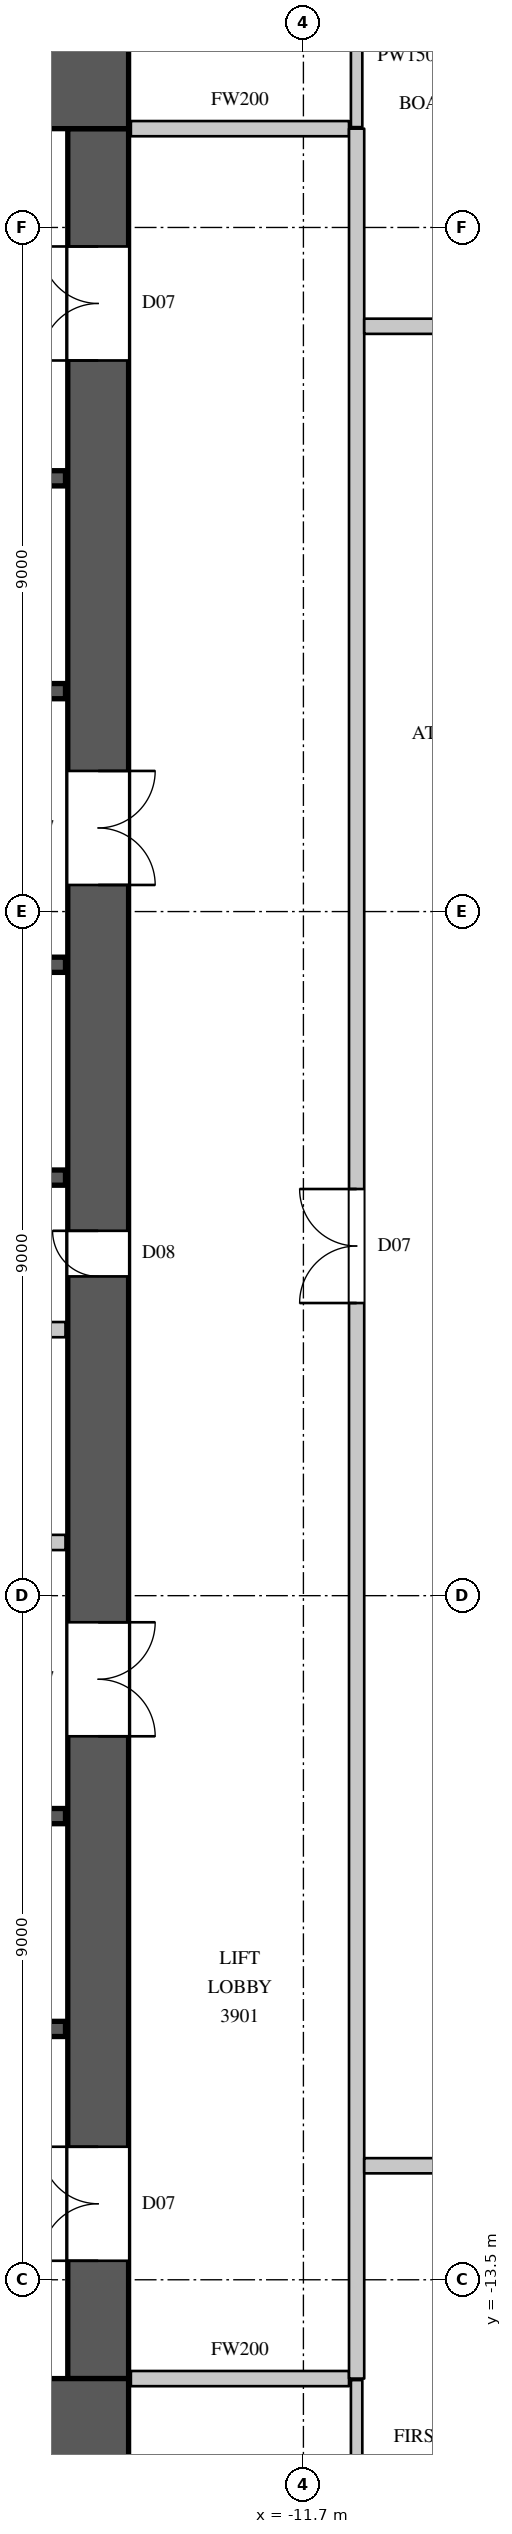
"""IFC4 building model, lengths in metres.
Left out: names, types, materials, properties, quantities, classifications, styles, units other than length and angle.
Written with IfcOpenShell. Run it as: python <this file> out.ifc"""

import sys

from ifc_helpers import new_model, si_unit, direction, frame, frame_2d, origin, place, context, subcontext, project, spatial, rectangle, extrude, element, fill, save


model = new_model("IFC4")
c1 = context("Model", 3, precision=1e-05, world=origin(), true_north=direction((0.0, 1.0)))
c2 = subcontext(c1, "Body", "Model", "MODEL_VIEW")
j1 = project(units=[si_unit("LENGTHUNIT", "METRE"), si_unit("PLANEANGLEUNIT", "RADIAN")], contexts=[c1])
p1 = place(None, origin())
s1 = spatial("IfcSite", under=j1, at=p1, CompositionType="ELEMENT")
p2 = place(p1, origin())
s2 = spatial("IfcBuilding", under=s1, at=p2, CompositionType="ELEMENT")
p3 = place(p2, frame((0.0, 0.0, 181.0)))
s3 = spatial("IfcBuildingStorey", under=s2, at=p3, CompositionType="ELEMENT", Elevation=181.0)
for number, where, z_axis, x_axis in (
    (1, (-30.0, 15.4, 0.0), (0.0, 0.0, 1.0), (1.0, 0.0, 0.0)),
    (2, (-30.0, -15.4, 0.0), (0.0, 0.0, 1.0), (1.0, 0.0, 0.0)),
):
    element("IfcWall", number, at=place(p3, frame(where, z_axis=z_axis, x_axis=x_axis)), inside=s3, PredefinedType="SHEAR", context=c2, shape_type="SweptSolid", body=[
        extrude(rectangle(XDim=16.0, YDim=1.2, at=frame_2d((8.0, 0.0))), origin(), (0.0, 0.0, 1.0), 4.1),
    ])
p4 = place(p3, frame((-14.4, -14.8, 0.0), z_axis=(0.0, 0.0, 1.0), x_axis=(0.0, 1.0, 0.0)))
e3 = element("IfcWall", 3, at=p4, inside=s3, PredefinedType="SHEAR", context=c2, shape_type="SweptSolid", body=[
    extrude(rectangle(XDim=29.6, YDim=0.8, at=frame_2d((14.8, 0.0))), origin(), (0.0, 0.0, 1.0), 4.1),
])
p5 = place(p4, frame((1.55, 0.0, 0.0)))
e4 = element("IfcOpeningElement", 4, at=p5, cuts=e3, PredefinedType="OPENING", context=c2, shape_type="SweptSolid", body=[
    extrude(rectangle(XDim=1.5, YDim=2.4, at=frame_2d((0.75, 1.2))), frame((0.0, 0.41, 0.0), z_axis=(0.0, -1.0, 0.0), x_axis=(1.0, 0.0, 0.0)), (0.0, 0.0, 1.0), 0.82),
])
p6 = place(p4, frame((26.55, 0.0, 0.0)))
e5 = element("IfcOpeningElement", 5, at=p6, cuts=e3, PredefinedType="OPENING", context=c2, shape_type="SweptSolid", body=[
    extrude(rectangle(XDim=1.5, YDim=2.4, at=frame_2d((0.75, 1.2))), frame((0.0, 0.41, 0.0), z_axis=(0.0, -1.0, 0.0), x_axis=(1.0, 0.0, 0.0)), (0.0, 0.0, 1.0), 0.82),
])
p7 = place(p4, frame((8.45, 0.0, 0.0)))
e6 = element("IfcOpeningElement", 6, at=p7, cuts=e3, PredefinedType="OPENING", context=c2, shape_type="SweptSolid", body=[
    extrude(rectangle(XDim=1.5, YDim=2.4, at=frame_2d((0.75, 1.2))), frame((0.0, 0.41, 0.0), z_axis=(0.0, -1.0, 0.0), x_axis=(1.0, 0.0, 0.0)), (0.0, 0.0, 1.0), 0.82),
])
p8 = place(p4, frame((19.65, 0.0, 0.0)))
e7 = element("IfcOpeningElement", 7, at=p8, cuts=e3, PredefinedType="OPENING", context=c2, shape_type="SweptSolid", body=[
    extrude(rectangle(XDim=1.5, YDim=2.4, at=frame_2d((0.75, 1.2))), frame((0.0, 0.41, 0.0), z_axis=(0.0, -1.0, 0.0), x_axis=(1.0, 0.0, 0.0)), (0.0, 0.0, 1.0), 0.82),
])
p9 = place(p4, frame((14.5, 0.0, 0.0)))
e8 = element("IfcOpeningElement", 8, at=p9, cuts=e3, PredefinedType="OPENING", context=c2, shape_type="SweptSolid", body=[
    extrude(rectangle(XDim=0.6, YDim=2.0, at=frame_2d((0.3, 1.0))), frame((0.0, 0.41, 0.0), z_axis=(0.0, -1.0, 0.0), x_axis=(1.0, 0.0, 0.0)), (0.0, 0.0, 1.0), 0.82),
])
p10 = place(p3, frame((-29.17, -3.8, 0.0), z_axis=(0.0, 0.0, 1.0), x_axis=(1.0, 0.0, 0.0)))
e9 = element("IfcWall", 9, at=p10, inside=s3, PredefinedType="PARTITIONING", context=c2, shape_type="SweptSolid", body=[
    extrude(rectangle(XDim=14.34, YDim=0.2, at=frame_2d((7.17, 0.0))), origin(), (0.0, 0.0, 1.0), 3.8),
])
p11 = place(p10, frame((6.7, 0.0, 0.0)))
e10 = element("IfcOpeningElement", 10, at=p11, cuts=e9, PredefinedType="OPENING", context=c2, shape_type="SweptSolid", body=[
    extrude(rectangle(XDim=0.9, YDim=2.2, at=frame_2d((0.45, 1.1))), frame((0.0, 0.11, 0.0), z_axis=(0.0, -1.0, 0.0), x_axis=(1.0, 0.0, 0.0)), (0.0, 0.0, 1.0), 0.22),
])
for number, where, z_axis, x_axis in (
    (11, (-13.97, -14.8, 0.0), (0.0, 0.0, 1.0), (1.0, 0.0, 0.0)),
    (12, (-13.97, 14.8, 0.0), (0.0, 0.0, 1.0), (1.0, 0.0, 0.0)),
):
    element("IfcWall", number, at=place(p3, frame(where, z_axis=z_axis, x_axis=x_axis)), inside=s3, PredefinedType="PARTITIONING", context=c2, shape_type="SweptSolid", body=[
        extrude(rectangle(XDim=2.87, YDim=0.2, at=frame_2d((1.435, 0.0))), origin(), (0.0, 0.0, 1.0), 3.8),
    ])
p12 = place(p3, frame((-11.0, -14.8, 0.0), z_axis=(0.0, 0.0, 1.0), x_axis=(0.0, 1.0, 0.0)))
e13 = element("IfcWall", 13, at=p12, inside=s3, PredefinedType="PARTITIONING", context=c2, shape_type="SweptSolid", body=[
    extrude(rectangle(XDim=29.6, YDim=0.2, at=frame_2d((14.8, 0.0))), origin(), (0.0, 0.0, 1.0), 3.8),
])
p13 = place(p12, frame((14.15, 0.0, 0.0)))
e14 = element("IfcOpeningElement", 14, at=p13, cuts=e13, PredefinedType="OPENING", context=c2, shape_type="SweptSolid", body=[
    extrude(rectangle(XDim=1.5, YDim=2.4, at=frame_2d((0.75, 1.2))), frame((0.0, 0.11, 0.0), z_axis=(0.0, -1.0, 0.0), x_axis=(1.0, 0.0, 0.0)), (0.0, 0.0, 1.0), 0.22),
])
p14 = place(p3, frame((-10.9, -12.0, 0.0), z_axis=(0.0, 0.0, 1.0), x_axis=(1.0, 0.0, 0.0)))
e15 = element("IfcWall", 15, at=p14, inside=s3, PredefinedType="PARTITIONING", context=c2, shape_type="SweptSolid", body=[
    extrude(rectangle(XDim=21.8, YDim=0.2, at=frame_2d((10.9, 0.0))), origin(), (0.0, 0.0, 1.0), 3.8),
])
p15 = place(p14, frame((0.95, 0.0, 0.0)))
e16 = element("IfcOpeningElement", 16, at=p15, cuts=e15, PredefinedType="OPENING", context=c2, shape_type="SweptSolid", body=[
    extrude(rectangle(XDim=0.9, YDim=2.2, at=frame_2d((0.45, 1.1))), frame((0.0, 0.11, 0.0), z_axis=(0.0, -1.0, 0.0), x_axis=(1.0, 0.0, 0.0)), (0.0, 0.0, 1.0), 0.22),
])
p16 = place(p14, frame((3.95, 0.0, 0.0)))
e17 = element("IfcOpeningElement", 17, at=p16, cuts=e15, PredefinedType="OPENING", context=c2, shape_type="SweptSolid", body=[
    extrude(rectangle(XDim=0.9, YDim=2.2, at=frame_2d((0.45, 1.1))), frame((0.0, 0.11, 0.0), z_axis=(0.0, -1.0, 0.0), x_axis=(1.0, 0.0, 0.0)), (0.0, 0.0, 1.0), 0.22),
])
p17 = place(p14, frame((6.7, 0.0, 0.0)))
e18 = element("IfcOpeningElement", 18, at=p17, cuts=e15, PredefinedType="OPENING", context=c2, shape_type="SweptSolid", body=[
    extrude(rectangle(XDim=0.9, YDim=2.2, at=frame_2d((0.45, 1.1))), frame((0.0, 0.11, 0.0), z_axis=(0.0, -1.0, 0.0), x_axis=(1.0, 0.0, 0.0)), (0.0, 0.0, 1.0), 0.22),
])
p18 = place(p14, frame((10.0, 0.0, 0.0)))
e19 = element("IfcOpeningElement", 19, at=p18, cuts=e15, PredefinedType="OPENING", context=c2, shape_type="SweptSolid", body=[
    extrude(rectangle(XDim=0.9, YDim=2.2, at=frame_2d((0.45, 1.1))), frame((0.0, 0.11, 0.0), z_axis=(0.0, -1.0, 0.0), x_axis=(1.0, 0.0, 0.0)), (0.0, 0.0, 1.0), 0.22),
])
p19 = place(p14, frame((13.55, 0.0, 0.0)))
e20 = element("IfcOpeningElement", 20, at=p19, cuts=e15, PredefinedType="OPENING", context=c2, shape_type="SweptSolid", body=[
    extrude(rectangle(XDim=0.9, YDim=2.2, at=frame_2d((0.45, 1.1))), frame((0.0, 0.11, 0.0), z_axis=(0.0, -1.0, 0.0), x_axis=(1.0, 0.0, 0.0)), (0.0, 0.0, 1.0), 0.22),
])
p20 = place(p14, frame((15.8, 0.0, 0.0)))
e21 = element("IfcOpeningElement", 21, at=p20, cuts=e15, PredefinedType="OPENING", context=c2, shape_type="SweptSolid", body=[
    extrude(rectangle(XDim=1.1, YDim=2.4, at=frame_2d((0.55, 1.2))), frame((0.0, 0.11, 0.0), z_axis=(0.0, -1.0, 0.0), x_axis=(1.0, 0.0, 0.0)), (0.0, 0.0, 1.0), 0.22),
])
p21 = place(p14, frame((18.0, 0.0, 0.0)))
e22 = element("IfcOpeningElement", 22, at=p21, cuts=e15, PredefinedType="OPENING", context=c2, shape_type="SweptSolid", body=[
    extrude(rectangle(XDim=1.1, YDim=2.4, at=frame_2d((0.55, 1.2))), frame((0.0, 0.11, 0.0), z_axis=(0.0, -1.0, 0.0), x_axis=(1.0, 0.0, 0.0)), (0.0, 0.0, 1.0), 0.22),
])
p22 = place(p3, frame((-10.9, 12.2, 0.0), z_axis=(0.0, 0.0, 1.0), x_axis=(1.0, 0.0, 0.0)))
e23 = element("IfcWall", 23, at=p22, inside=s3, PredefinedType="PARTITIONING", context=c2, shape_type="SweptSolid", body=[
    extrude(rectangle(XDim=3.704, YDim=0.2, at=frame_2d((1.852, 0.0))), origin(), (0.0, 0.0, 1.0), 3.8),
])
p23 = place(p22, frame((1.7, 0.0, 0.0)))
e24 = element("IfcOpeningElement", 24, at=p23, cuts=e23, PredefinedType="OPENING", context=c2, shape_type="SweptSolid", body=[
    extrude(rectangle(XDim=1.1, YDim=2.4, at=frame_2d((0.55, 1.2))), frame((0.0, 0.11, 0.0), z_axis=(0.0, -1.0, 0.0), x_axis=(1.0, 0.0, 0.0)), (0.0, 0.0, 1.0), 0.22),
])
for number, where, z_axis, x_axis in (
    (25, (-11.0, -16.7, 0.0), (0.0, 0.0, 1.0), (0.0, 1.0, 0.0)),
    (26, (-11.0, 14.82, 0.0), (0.0, 0.0, 1.0), (0.0, 1.0, 0.0)),
):
    element("IfcWall", number, at=place(p3, frame(where, z_axis=z_axis, x_axis=x_axis)), inside=s3, PredefinedType="PARTITIONING", context=c2, shape_type="SweptSolid", body=[
        extrude(rectangle(XDim=1.88, YDim=0.15, at=frame_2d((0.94, 0.0))), origin(), (0.0, 0.0, 1.0), 3.8),
    ])
p24 = place(p3, frame((-29.17, -1.0, 0.0), z_axis=(0.0, 0.0, 1.0), x_axis=(1.0, 0.0, 0.0)))
e27 = element("IfcWall", 27, at=p24, inside=s3, PredefinedType="PARTITIONING", context=c2, shape_type="SweptSolid", body=[
    extrude(rectangle(XDim=14.34, YDim=0.2, at=frame_2d((7.17, 0.0))), origin(), (0.0, 0.0, 1.0), 3.8),
])
p25 = place(p3, frame((-26.08, 1.0, 0.0), z_axis=(0.0, 0.0, 1.0), x_axis=(1.0, 0.0, 0.0)))
e28 = element("IfcWall", 28, at=p25, inside=s3, PredefinedType="SHEAR", context=c2, shape_type="SweptSolid", body=[
    extrude(rectangle(XDim=11.25, YDim=0.2, at=frame_2d((5.625, 0.0))), origin(), (0.0, 0.0, 1.0), 3.8),
])
p26 = place(p3, frame((-26.08, 3.8, 0.0), z_axis=(0.0, 0.0, 1.0), x_axis=(1.0, 0.0, 0.0)))
e29 = element("IfcWall", 29, at=p26, inside=s3, PredefinedType="SHEAR", context=c2, shape_type="SweptSolid", body=[
    extrude(rectangle(XDim=11.25, YDim=0.2, at=frame_2d((5.625, 0.0))), origin(), (0.0, 0.0, 1.0), 3.8),
])
p27 = place(p26, frame((0.8, 0.0, 0.0)))
e30 = element("IfcOpeningElement", 30, at=p27, cuts=e29, PredefinedType="OPENING", context=c2, shape_type="SweptSolid", body=[
    extrude(rectangle(XDim=1.1, YDim=2.2, at=frame_2d((0.55, 1.1))), frame((0.0, 0.11, 0.0), z_axis=(0.0, -1.0, 0.0), x_axis=(1.0, 0.0, 0.0)), (0.0, 0.0, 1.0), 0.22),
])
p28 = place(p26, frame((3.55, 0.0, 0.0)))
e31 = element("IfcOpeningElement", 31, at=p28, cuts=e29, PredefinedType="OPENING", context=c2, shape_type="SweptSolid", body=[
    extrude(rectangle(XDim=1.1, YDim=2.2, at=frame_2d((0.55, 1.1))), frame((0.0, 0.11, 0.0), z_axis=(0.0, -1.0, 0.0), x_axis=(1.0, 0.0, 0.0)), (0.0, 0.0, 1.0), 0.22),
])
p29 = place(p26, frame((6.25, 0.0, 0.0)))
e32 = element("IfcOpeningElement", 32, at=p29, cuts=e29, PredefinedType="OPENING", context=c2, shape_type="SweptSolid", body=[
    extrude(rectangle(XDim=1.1, YDim=2.2, at=frame_2d((0.55, 1.1))), frame((0.0, 0.11, 0.0), z_axis=(0.0, -1.0, 0.0), x_axis=(1.0, 0.0, 0.0)), (0.0, 0.0, 1.0), 0.22),
])
p30 = place(p26, frame((9.15, 0.0, 0.0)))
e33 = element("IfcOpeningElement", 33, at=p30, cuts=e29, PredefinedType="OPENING", context=c2, shape_type="SweptSolid", body=[
    extrude(rectangle(XDim=1.1, YDim=2.2, at=frame_2d((0.55, 1.1))), frame((0.0, 0.11, 0.0), z_axis=(0.0, -1.0, 0.0), x_axis=(1.0, 0.0, 0.0)), (0.0, 0.0, 1.0), 0.22),
])
p31 = place(p3, frame((-17.92, -10.2, 0.0), z_axis=(0.0, 0.0, 1.0), x_axis=(1.0, 0.0, 0.0)))
e34 = element("IfcWall", 34, at=p31, inside=s3, PredefinedType="SHEAR", context=c2, shape_type="SweptSolid", body=[
    extrude(rectangle(XDim=3.09, YDim=0.2, at=frame_2d((1.545, 0.0))), origin(), (0.0, 0.0, 1.0), 3.8),
])
p32 = place(p31, frame((1.0, 0.0, 0.0)))
e35 = element("IfcOpeningElement", 35, at=p32, cuts=e34, PredefinedType="OPENING", context=c2, shape_type="SweptSolid", body=[
    extrude(rectangle(XDim=1.1, YDim=2.2, at=frame_2d((0.55, 1.1))), frame((0.0, 0.11, 0.0), z_axis=(0.0, -1.0, 0.0), x_axis=(1.0, 0.0, 0.0)), (0.0, 0.0, 1.0), 0.22),
])
p33 = place(p3, frame((-17.9, -7.4, 0.0), z_axis=(0.0, 0.0, 1.0), x_axis=(1.0, 0.0, 0.0)))
e36 = element("IfcWall", 36, at=p33, inside=s3, PredefinedType="SHEAR", context=c2, shape_type="SweptSolid", body=[
    extrude(rectangle(XDim=3.07, YDim=0.2, at=frame_2d((1.535, 0.0))), origin(), (0.0, 0.0, 1.0), 3.8),
])
p34 = place(p3, frame((-17.92, 7.4, 0.0), z_axis=(0.0, 0.0, 1.0), x_axis=(1.0, 0.0, 0.0)))
e37 = element("IfcWall", 37, at=p34, inside=s3, PredefinedType="SHEAR", context=c2, shape_type="SweptSolid", body=[
    extrude(rectangle(XDim=3.09, YDim=0.2, at=frame_2d((1.545, 0.0))), origin(), (0.0, 0.0, 1.0), 3.8),
])
p35 = place(p3, frame((-17.92, 10.2, 0.0), z_axis=(0.0, 0.0, 1.0), x_axis=(1.0, 0.0, 0.0)))
e38 = element("IfcWall", 38, at=p35, inside=s3, PredefinedType="SHEAR", context=c2, shape_type="SweptSolid", body=[
    extrude(rectangle(XDim=3.09, YDim=0.2, at=frame_2d((1.545, 0.0))), origin(), (0.0, 0.0, 1.0), 3.8),
])
p36 = place(p35, frame((1.0, 0.0, 0.0)))
e39 = element("IfcOpeningElement", 39, at=p36, cuts=e38, PredefinedType="OPENING", context=c2, shape_type="SweptSolid", body=[
    extrude(rectangle(XDim=1.1, YDim=2.2, at=frame_2d((0.55, 1.1))), frame((0.0, 0.11, 0.0), z_axis=(0.0, -1.0, 0.0), x_axis=(1.0, 0.0, 0.0)), (0.0, 0.0, 1.0), 0.22),
])
p37 = place(p13, origin())
e40 = element("IfcDoor", 40, at=p37, inside=s3, OperationType="DOUBLE_DOOR_SINGLE_SWING", PredefinedType="DOOR", context=c2, shape_type="SweptSolid", body=[
    extrude(rectangle(XDim=1.5, YDim=2.4, at=frame_2d((0.75, 1.2))), frame((0.0, 0.025, 0.0), z_axis=(0.0, -1.0, 0.0), x_axis=(1.0, 0.0, 0.0)), (0.0, 0.0, 1.0), 0.05),
])
fill(e14, e40)
p38 = place(p5, origin())
e41 = element("IfcDoor", 41, at=p38, inside=s3, OperationType="DOUBLE_DOOR_SINGLE_SWING", PredefinedType="DOOR", context=c2, shape_type="SweptSolid", body=[
    extrude(rectangle(XDim=1.5, YDim=2.4, at=frame_2d((0.75, 1.2))), frame((0.0, 0.395, 0.0), z_axis=(0.0, -1.0, 0.0), x_axis=(1.0, 0.0, 0.0)), (0.0, 0.0, 1.0), 0.05),
])
fill(e4, e41)
p39 = place(p6, origin())
e42 = element("IfcDoor", 42, at=p39, inside=s3, OperationType="DOUBLE_DOOR_SINGLE_SWING", PredefinedType="DOOR", context=c2, shape_type="SweptSolid", body=[
    extrude(rectangle(XDim=1.5, YDim=2.4, at=frame_2d((0.75, 1.2))), frame((0.0, 0.395, 0.0), z_axis=(0.0, -1.0, 0.0), x_axis=(1.0, 0.0, 0.0)), (0.0, 0.0, 1.0), 0.05),
])
fill(e5, e42)
p40 = place(p7, origin())
e43 = element("IfcDoor", 43, at=p40, inside=s3, OperationType="DOUBLE_DOOR_SINGLE_SWING", PredefinedType="DOOR", context=c2, shape_type="SweptSolid", body=[
    extrude(rectangle(XDim=1.5, YDim=2.4, at=frame_2d((0.75, 1.2))), frame((0.0, -0.345, 0.0), z_axis=(0.0, -1.0, 0.0), x_axis=(1.0, 0.0, 0.0)), (0.0, 0.0, 1.0), 0.05),
])
fill(e6, e43)
p41 = place(p8, origin())
e44 = element("IfcDoor", 44, at=p41, inside=s3, OperationType="DOUBLE_DOOR_SINGLE_SWING", PredefinedType="DOOR", context=c2, shape_type="SweptSolid", body=[
    extrude(rectangle(XDim=1.5, YDim=2.4, at=frame_2d((0.75, 1.2))), frame((0.0, -0.345, 0.0), z_axis=(0.0, -1.0, 0.0), x_axis=(1.0, 0.0, 0.0)), (0.0, 0.0, 1.0), 0.05),
])
fill(e7, e44)
p42 = place(p9, origin())
e45 = element("IfcDoor", 45, at=p42, inside=s3, OperationType="SINGLE_SWING_RIGHT", PredefinedType="DOOR", context=c2, shape_type="SweptSolid", body=[
    extrude(rectangle(XDim=0.6, YDim=2.0, at=frame_2d((0.3, 1.0))), frame((0.0, 0.395, 0.0), z_axis=(0.0, -1.0, 0.0), x_axis=(1.0, 0.0, 0.0)), (0.0, 0.0, 1.0), 0.05),
])
fill(e8, e45)
save(model, sys.argv[1])
